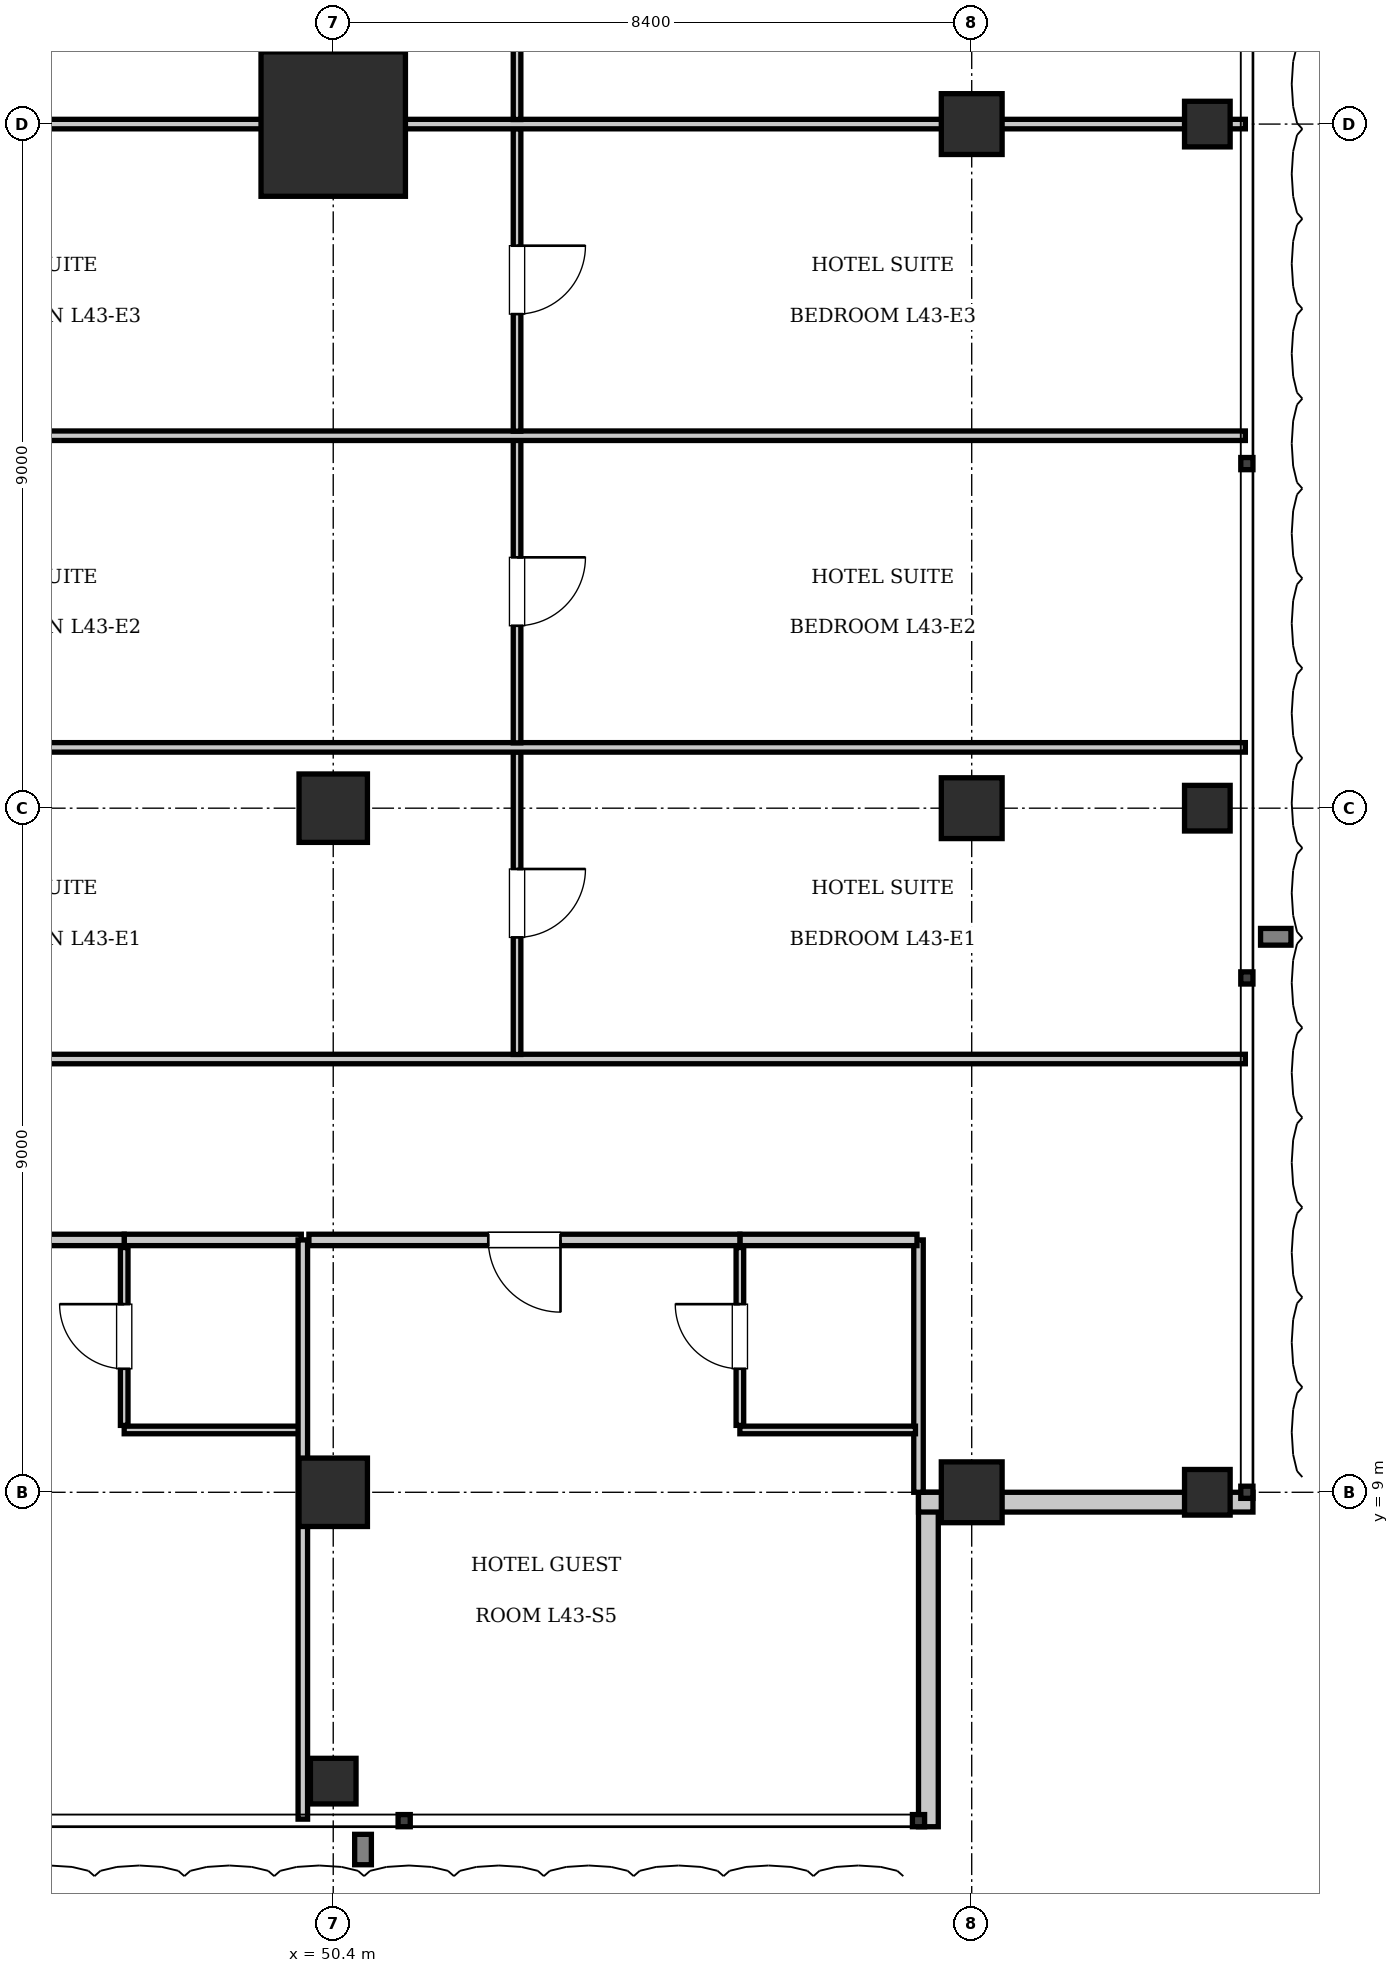
"""IFC4 building model, lengths in metres.
Left out: names, types, materials, properties, quantities, classifications, styles, units other than length and angle.
Written with IfcOpenShell. Run it as: python <this file> out.ifc"""

import sys

from ifc_helpers import new_model, si_unit, direction, frame, frame_2d, origin, origin_2d, place, context, subcontext, project, spatial, rectangle, i_section, extrude, element, fill, save


model = new_model("IFC4")
c1 = context("Model", 3, precision=1e-05, world=origin(), true_north=direction((0.0, 1.0)))
c2 = subcontext(c1, "Body", "Model", "MODEL_VIEW")
j1 = project(units=[si_unit("LENGTHUNIT", "METRE"), si_unit("PLANEANGLEUNIT", "RADIAN")], contexts=[c1])
p1 = place(None, origin())
s1 = spatial("IfcSite", under=j1, at=p1, CompositionType="ELEMENT")
p2 = place(p1, origin())
s2 = spatial("IfcBuilding", under=s1, at=p2, CompositionType="ELEMENT")
p3 = place(p2, frame((0.0, 0.0, 177.45)))
s3 = spatial("IfcBuildingStorey", under=s2, at=p3, CompositionType="ELEMENT", Elevation=177.45)
p4 = place(p3, frame((50.4, 27.0, 0.0), z_axis=(0.0, 0.0, 1.0), x_axis=(1.0, 0.0, 0.0)))
e1 = element("IfcColumn", 1, at=p4, inside=s3, PredefinedType="COLUMN", context=c2, shape_type="SweptSolid", body=[
    extrude(rectangle(XDim=1.9, YDim=1.9, at=origin_2d()), origin(), (0.0, 0.0, 1.0), 3.85),
])
for number, where, z_axis, x_axis in (
    (2, (50.4, 18.0, 0.0), (0.0, 0.0, 1.0), (1.0, 0.0, 0.0)),
    (3, (50.4, 9.0, 0.0), (0.0, 0.0, 1.0), (1.0, 0.0, 0.0)),
):
    element("IfcColumn", number, at=place(p3, frame(where, z_axis=z_axis, x_axis=x_axis)), inside=s3, PredefinedType="COLUMN", context=c2, shape_type="SweptSolid", body=[
        extrude(rectangle(XDim=0.9, YDim=0.9, at=origin_2d()), origin(), (0.0, 0.0, 1.0), 3.85),
    ])
for number, where, z_axis, x_axis in (
    (4, (58.8, 9.0, 0.0), (0.0, 0.0, 1.0), (1.0, 0.0, 0.0)),
    (5, (58.8, 18.0, 0.0), (0.0, 0.0, 1.0), (1.0, 0.0, 0.0)),
    (6, (58.8, 27.0, 0.0), (0.0, 0.0, 1.0), (1.0, 0.0, 0.0)),
):
    element("IfcColumn", number, at=place(p3, frame(where, z_axis=z_axis, x_axis=x_axis)), inside=s3, PredefinedType="COLUMN", context=c2, shape_type="SweptSolid", body=[
        extrude(rectangle(XDim=0.8, YDim=0.8, at=origin_2d()), origin(), (0.0, 0.0, 1.0), 3.85),
    ])
for number, where, z_axis, x_axis in (
    (7, (61.9, 9.0, 0.0), (0.0, 0.0, 1.0), (1.0, 0.0, 0.0)),
    (8, (61.9, 18.0, 0.0), (0.0, 0.0, 1.0), (1.0, 0.0, 0.0)),
    (9, (61.9, 27.0, 0.0), (0.0, 0.0, 1.0), (1.0, 0.0, 0.0)),
    (10, (50.4, 5.2, 0.0), (0.0, 0.0, 1.0), (1.0, 0.0, 0.0)),
):
    element("IfcColumn", number, at=place(p3, frame(where, z_axis=z_axis, x_axis=x_axis)), inside=s3, PredefinedType="COLUMN", context=c2, shape_type="SweptSolid", body=[
        extrude(i_section(OverallWidth=0.6, OverallDepth=0.6, WebThickness=0.025, FlangeThickness=0.038, at=origin_2d()), origin(), (0.0, 0.0, 1.0), 3.85),
    ])
p5 = place(p3, frame((58.23, 9.0, 0.0), z_axis=(0.0, 0.0, 1.0), x_axis=(0.0, -1.0, 0.0)))
e11 = element("IfcWall", 11, at=p5, inside=s3, PredefinedType="SOLIDWALL", context=c2, shape_type="SweptSolid", body=[
    extrude(rectangle(XDim=4.4, YDim=0.26, at=frame_2d((2.2, 0.0))), origin(), (0.0, 0.0, 1.0), 3.61),
])
p6 = place(p3, frame((62.5, 8.87, 0.0), z_axis=(0.0, 0.0, 1.0), x_axis=(-1.0, 0.0, 0.0)))
e12 = element("IfcWall", 12, at=p6, inside=s3, PredefinedType="SOLIDWALL", context=c2, shape_type="SweptSolid", body=[
    extrude(rectangle(XDim=4.4, YDim=0.26, at=frame_2d((2.2, 0.0))), origin(), (0.0, 0.0, 1.0), 3.007),
])
p7 = place(p3, frame((58.1, 9.0, 0.0), z_axis=(0.0, 0.0, 1.0), x_axis=(0.0, 1.0, 0.0)))
e13 = element("IfcWall", 13, at=p7, inside=s3, PredefinedType="PARTITIONING", context=c2, shape_type="SweptSolid", body=[
    extrude(rectangle(XDim=3.32, YDim=0.125, at=frame_2d((1.66, 0.0))), origin(), (0.0, 0.0, 1.0), 3.61),
])
p8 = place(p3, frame((47.65, 12.32, 0.0), z_axis=(0.0, 0.0, 1.0), x_axis=(1.0, 0.0, 0.0)))
e14 = element("IfcWall", 14, at=p8, inside=s3, PredefinedType="PARTITIONING", context=c2, shape_type="SweptSolid", body=[
    extrude(rectangle(XDim=2.33, YDim=0.15, at=frame_2d((1.165, 0.0))), origin(), (0.0, 0.0, 1.0), 3.61),
])
p9 = place(p3, frame((47.65, 9.82, 0.0), z_axis=(0.0, 0.0, 1.0), x_axis=(1.0, 0.0, 0.0)))
e15 = element("IfcWall", 15, at=p9, inside=s3, PredefinedType="PARTITIONING", context=c2, shape_type="SweptSolid", body=[
    extrude(rectangle(XDim=2.31, YDim=0.1, at=frame_2d((1.155, 0.0))), origin(), (0.0, 0.0, 1.0), 3.61),
])
p10 = place(p3, frame((47.65, 9.88, 0.0), z_axis=(0.0, 0.0, 1.0), x_axis=(0.0, 1.0, 0.0)))
e16 = element("IfcWall", 16, at=p10, inside=s3, PredefinedType="PARTITIONING", context=c2, shape_type="SweptSolid", body=[
    extrude(rectangle(XDim=2.34, YDim=0.1, at=frame_2d((1.17, 0.0))), origin(), (0.0, 0.0, 1.0), 3.61),
])
p11 = place(p10, frame((0.745, 0.0, 0.0)))
e17 = element("IfcOpeningElement", 17, at=p11, cuts=e16, PredefinedType="OPENING", context=c2, shape_type="SweptSolid", body=[
    extrude(rectangle(XDim=0.85, YDim=2.1, at=frame_2d((0.425, 1.05))), frame((0.0, 0.06, 0.0), z_axis=(0.0, -1.0, 0.0), x_axis=(1.0, 0.0, 0.0)), (0.0, 0.0, 1.0), 0.12),
])
p12 = place(p3, frame((41.98, 12.32, 0.0), z_axis=(0.0, 0.0, 1.0), x_axis=(1.0, 0.0, 0.0)))
e18 = element("IfcWall", 18, at=p12, inside=s3, PredefinedType="PARTITIONING", context=c2, shape_type="SweptSolid", body=[
    extrude(rectangle(XDim=5.67, YDim=0.15, at=frame_2d((2.835, 0.0))), origin(), (0.0, 0.0, 1.0), 3.61),
])
p13 = place(p12, frame((2.36, 0.0, 0.0)))
e19 = element("IfcOpeningElement", 19, at=p13, cuts=e18, PredefinedType="OPENING", context=c2, shape_type="SweptSolid", body=[
    extrude(rectangle(XDim=0.95, YDim=2.15, at=frame_2d((0.475, 1.075))), frame((0.0, 0.085, 0.0), z_axis=(0.0, -1.0, 0.0), x_axis=(1.0, 0.0, 0.0)), (0.0, 0.0, 1.0), 0.17),
])
p14 = place(p3, frame((50.0, 4.7, 0.0), z_axis=(0.0, 0.0, 1.0), x_axis=(0.0, 1.0, 0.0)))
e20 = element("IfcWall", 20, at=p14, inside=s3, PredefinedType="PARTITIONING", context=c2, shape_type="SweptSolid", body=[
    extrude(rectangle(XDim=7.62, YDim=0.125, at=frame_2d((3.81, 0.0))), origin(), (0.0, 0.0, 1.0), 3.61),
])
p15 = place(p3, frame((55.75, 12.32, 0.0), z_axis=(0.0, 0.0, 1.0), x_axis=(1.0, 0.0, 0.0)))
e21 = element("IfcWall", 21, at=p15, inside=s3, PredefinedType="PARTITIONING", context=c2, shape_type="SweptSolid", body=[
    extrude(rectangle(XDim=2.33, YDim=0.15, at=frame_2d((1.165, 0.0))), origin(), (0.0, 0.0, 1.0), 3.61),
])
p16 = place(p3, frame((55.75, 9.82, 0.0), z_axis=(0.0, 0.0, 1.0), x_axis=(1.0, 0.0, 0.0)))
e22 = element("IfcWall", 22, at=p16, inside=s3, PredefinedType="PARTITIONING", context=c2, shape_type="SweptSolid", body=[
    extrude(rectangle(XDim=2.31, YDim=0.1, at=frame_2d((1.155, 0.0))), origin(), (0.0, 0.0, 1.0), 3.61),
])
p17 = place(p3, frame((55.75, 9.88, 0.0), z_axis=(0.0, 0.0, 1.0), x_axis=(0.0, 1.0, 0.0)))
e23 = element("IfcWall", 23, at=p17, inside=s3, PredefinedType="PARTITIONING", context=c2, shape_type="SweptSolid", body=[
    extrude(rectangle(XDim=2.34, YDim=0.1, at=frame_2d((1.17, 0.0))), origin(), (0.0, 0.0, 1.0), 3.61),
])
p18 = place(p17, frame((0.745, 0.0, 0.0)))
e24 = element("IfcOpeningElement", 24, at=p18, cuts=e23, PredefinedType="OPENING", context=c2, shape_type="SweptSolid", body=[
    extrude(rectangle(XDim=0.85, YDim=2.1, at=frame_2d((0.425, 1.05))), frame((0.0, 0.06, 0.0), z_axis=(0.0, -1.0, 0.0), x_axis=(1.0, 0.0, 0.0)), (0.0, 0.0, 1.0), 0.12),
])
p19 = place(p3, frame((50.08, 12.32, 0.0), z_axis=(0.0, 0.0, 1.0), x_axis=(1.0, 0.0, 0.0)))
e25 = element("IfcWall", 25, at=p19, inside=s3, PredefinedType="PARTITIONING", context=c2, shape_type="SweptSolid", body=[
    extrude(rectangle(XDim=5.67, YDim=0.15, at=frame_2d((2.835, 0.0))), origin(), (0.0, 0.0, 1.0), 3.61),
])
p20 = place(p19, frame((2.36, 0.0, 0.0)))
e26 = element("IfcOpeningElement", 26, at=p20, cuts=e25, PredefinedType="OPENING", context=c2, shape_type="SweptSolid", body=[
    extrude(rectangle(XDim=0.95, YDim=2.15, at=frame_2d((0.475, 1.075))), frame((0.0, 0.085, 0.0), z_axis=(0.0, -1.0, 0.0), x_axis=(1.0, 0.0, 0.0)), (0.0, 0.0, 1.0), 0.17),
])
p21 = place(p3, frame((39.88, 14.7, 0.0), z_axis=(0.0, 0.0, 1.0), x_axis=(1.0, 0.0, 0.0)))
e27 = element("IfcWall", 27, at=p21, inside=s3, PredefinedType="PARTITIONING", context=c2, shape_type="SweptSolid", body=[
    extrude(rectangle(XDim=22.52, YDim=0.125, at=frame_2d((11.26, 0.0))), origin(), (0.0, 0.0, 1.0), 3.61),
])
p22 = place(p3, frame((52.818, 14.76, 0.0), z_axis=(0.0, 0.0, 1.0), x_axis=(0.0, 1.0, 0.0)))
e28 = element("IfcWall", 28, at=p22, inside=s3, PredefinedType="PARTITIONING", context=c2, shape_type="SweptSolid", body=[
    extrude(rectangle(XDim=3.98, YDim=0.1, at=frame_2d((1.99, 0.0))), origin(), (0.0, 0.0, 1.0), 3.61),
])
p23 = place(p22, frame((1.54, 0.0, 0.0)))
e29 = element("IfcOpeningElement", 29, at=p23, cuts=e28, PredefinedType="OPENING", context=c2, shape_type="SweptSolid", body=[
    extrude(rectangle(XDim=0.9, YDim=2.1, at=frame_2d((0.45, 1.05))), frame((0.0, 0.06, 0.0), z_axis=(0.0, -1.0, 0.0), x_axis=(1.0, 0.0, 0.0)), (0.0, 0.0, 1.0), 0.12),
])
p24 = place(p3, frame((39.88, 18.8, 0.0), z_axis=(0.0, 0.0, 1.0), x_axis=(1.0, 0.0, 0.0)))
e30 = element("IfcWall", 30, at=p24, inside=s3, PredefinedType="PARTITIONING", context=c2, shape_type="SweptSolid", body=[
    extrude(rectangle(XDim=22.52, YDim=0.125, at=frame_2d((11.26, 0.0))), origin(), (0.0, 0.0, 1.0), 3.61),
])
p25 = place(p3, frame((52.818, 18.86, 0.0), z_axis=(0.0, 0.0, 1.0), x_axis=(0.0, 1.0, 0.0)))
e31 = element("IfcWall", 31, at=p25, inside=s3, PredefinedType="PARTITIONING", context=c2, shape_type="SweptSolid", body=[
    extrude(rectangle(XDim=3.98, YDim=0.1, at=frame_2d((1.99, 0.0))), origin(), (0.0, 0.0, 1.0), 3.61),
])
p26 = place(p25, frame((1.54, 0.0, 0.0)))
e32 = element("IfcOpeningElement", 32, at=p26, cuts=e31, PredefinedType="OPENING", context=c2, shape_type="SweptSolid", body=[
    extrude(rectangle(XDim=0.9, YDim=2.1, at=frame_2d((0.45, 1.05))), frame((0.0, 0.06, 0.0), z_axis=(0.0, -1.0, 0.0), x_axis=(1.0, 0.0, 0.0)), (0.0, 0.0, 1.0), 0.12),
])
p27 = place(p3, frame((39.88, 22.9, 0.0), z_axis=(0.0, 0.0, 1.0), x_axis=(1.0, 0.0, 0.0)))
e33 = element("IfcWall", 33, at=p27, inside=s3, PredefinedType="PARTITIONING", context=c2, shape_type="SweptSolid", body=[
    extrude(rectangle(XDim=22.52, YDim=0.125, at=frame_2d((11.26, 0.0))), origin(), (0.0, 0.0, 1.0), 3.61),
])
p28 = place(p3, frame((52.818, 22.96, 0.0), z_axis=(0.0, 0.0, 1.0), x_axis=(0.0, 1.0, 0.0)))
e34 = element("IfcWall", 34, at=p28, inside=s3, PredefinedType="PARTITIONING", context=c2, shape_type="SweptSolid", body=[
    extrude(rectangle(XDim=3.98, YDim=0.1, at=frame_2d((1.99, 0.0))), origin(), (0.0, 0.0, 1.0), 3.61),
])
p29 = place(p28, frame((1.54, 0.0, 0.0)))
e35 = element("IfcOpeningElement", 35, at=p29, cuts=e34, PredefinedType="OPENING", context=c2, shape_type="SweptSolid", body=[
    extrude(rectangle(XDim=0.9, YDim=2.1, at=frame_2d((0.45, 1.05))), frame((0.0, 0.06, 0.0), z_axis=(0.0, -1.0, 0.0), x_axis=(1.0, 0.0, 0.0)), (0.0, 0.0, 1.0), 0.12),
])
p30 = place(p3, frame((39.88, 27.0, 0.0), z_axis=(0.0, 0.0, 1.0), x_axis=(1.0, 0.0, 0.0)))
e36 = element("IfcWall", 36, at=p30, inside=s3, PredefinedType="PARTITIONING", context=c2, shape_type="SweptSolid", body=[
    extrude(rectangle(XDim=22.52, YDim=0.125, at=frame_2d((11.26, 0.0))), origin(), (0.0, 0.0, 1.0), 2.41),
])
p31 = place(p3, frame((52.818, 27.06, 0.0), z_axis=(0.0, 0.0, 1.0), x_axis=(0.0, 1.0, 0.0)))
e37 = element("IfcWall", 37, at=p31, inside=s3, PredefinedType="PARTITIONING", context=c2, shape_type="SweptSolid", body=[
    extrude(rectangle(XDim=3.98, YDim=0.1, at=frame_2d((1.99, 0.0))), origin(), (0.0, 0.0, 1.0), 3.61),
])
p32 = place(p31, frame((1.54, 0.0, 0.0)))
e38 = element("IfcOpeningElement", 38, at=p32, cuts=e37, PredefinedType="OPENING", context=c2, shape_type="SweptSolid", body=[
    extrude(rectangle(XDim=0.9, YDim=2.1, at=frame_2d((0.45, 1.05))), frame((0.0, 0.06, 0.0), z_axis=(0.0, -1.0, 0.0), x_axis=(1.0, 0.0, 0.0)), (0.0, 0.0, 1.0), 0.12),
])
p33 = place(p11, origin())
e39 = element("IfcDoor", 39, at=p33, inside=s3, OperationType="SINGLE_SWING_RIGHT", PredefinedType="DOOR", context=c2, shape_type="SweptSolid", body=[
    extrude(rectangle(XDim=0.85, YDim=2.1, at=frame_2d((0.425, 1.05))), frame((0.0, 0.025, 0.0), z_axis=(0.0, -1.0, 0.0), x_axis=(1.0, 0.0, 0.0)), (0.0, 0.0, 1.0), 0.05),
])
fill(e17, e39)
p34 = place(p18, origin())
e40 = element("IfcDoor", 40, at=p34, inside=s3, OperationType="SINGLE_SWING_RIGHT", PredefinedType="DOOR", context=c2, shape_type="SweptSolid", body=[
    extrude(rectangle(XDim=0.85, YDim=2.1, at=frame_2d((0.425, 1.05))), frame((0.0, 0.025, 0.0), z_axis=(0.0, -1.0, 0.0), x_axis=(1.0, 0.0, 0.0)), (0.0, 0.0, 1.0), 0.05),
])
fill(e24, e40)
p35 = place(p20, frame((0.95, 0.0, 0.0), z_axis=(0.0, 0.0, 1.0), x_axis=(-1.0, 0.0, 0.0)))
e41 = element("IfcDoor", 41, at=p35, inside=s3, OperationType="SINGLE_SWING_LEFT", PredefinedType="DOOR", context=c2, shape_type="SweptSolid", body=[
    extrude(rectangle(XDim=0.95, YDim=2.15, at=frame_2d((0.475, 1.075))), frame((0.0, 0.025, 0.0), z_axis=(0.0, -1.0, 0.0), x_axis=(1.0, 0.0, 0.0)), (0.0, 0.0, 1.0), 0.05),
])
fill(e26, e41)
p36 = place(p23, frame((0.9, 0.0, 0.0), z_axis=(0.0, 0.0, 1.0), x_axis=(-1.0, 0.0, 0.0)))
e42 = element("IfcDoor", 42, at=p36, inside=s3, OperationType="SINGLE_SWING_LEFT", PredefinedType="DOOR", context=c2, shape_type="SweptSolid", body=[
    extrude(rectangle(XDim=0.9, YDim=2.1, at=frame_2d((0.45, 1.05))), frame((0.0, 0.025, 0.0), z_axis=(0.0, -1.0, 0.0), x_axis=(1.0, 0.0, 0.0)), (0.0, 0.0, 1.0), 0.05),
])
fill(e29, e42)
p37 = place(p26, frame((0.9, 0.0, 0.0), z_axis=(0.0, 0.0, 1.0), x_axis=(-1.0, 0.0, 0.0)))
e43 = element("IfcDoor", 43, at=p37, inside=s3, OperationType="SINGLE_SWING_LEFT", PredefinedType="DOOR", context=c2, shape_type="SweptSolid", body=[
    extrude(rectangle(XDim=0.9, YDim=2.1, at=frame_2d((0.45, 1.05))), frame((0.0, 0.025, 0.0), z_axis=(0.0, -1.0, 0.0), x_axis=(1.0, 0.0, 0.0)), (0.0, 0.0, 1.0), 0.05),
])
fill(e32, e43)
p38 = place(p29, frame((0.9, 0.0, 0.0), z_axis=(0.0, 0.0, 1.0), x_axis=(-1.0, 0.0, 0.0)))
e44 = element("IfcDoor", 44, at=p38, inside=s3, OperationType="SINGLE_SWING_LEFT", PredefinedType="DOOR", context=c2, shape_type="SweptSolid", body=[
    extrude(rectangle(XDim=0.9, YDim=2.1, at=frame_2d((0.45, 1.05))), frame((0.0, 0.025, 0.0), z_axis=(0.0, -1.0, 0.0), x_axis=(1.0, 0.0, 0.0)), (0.0, 0.0, 1.0), 0.05),
])
fill(e35, e44)
save(model, sys.argv[1])
